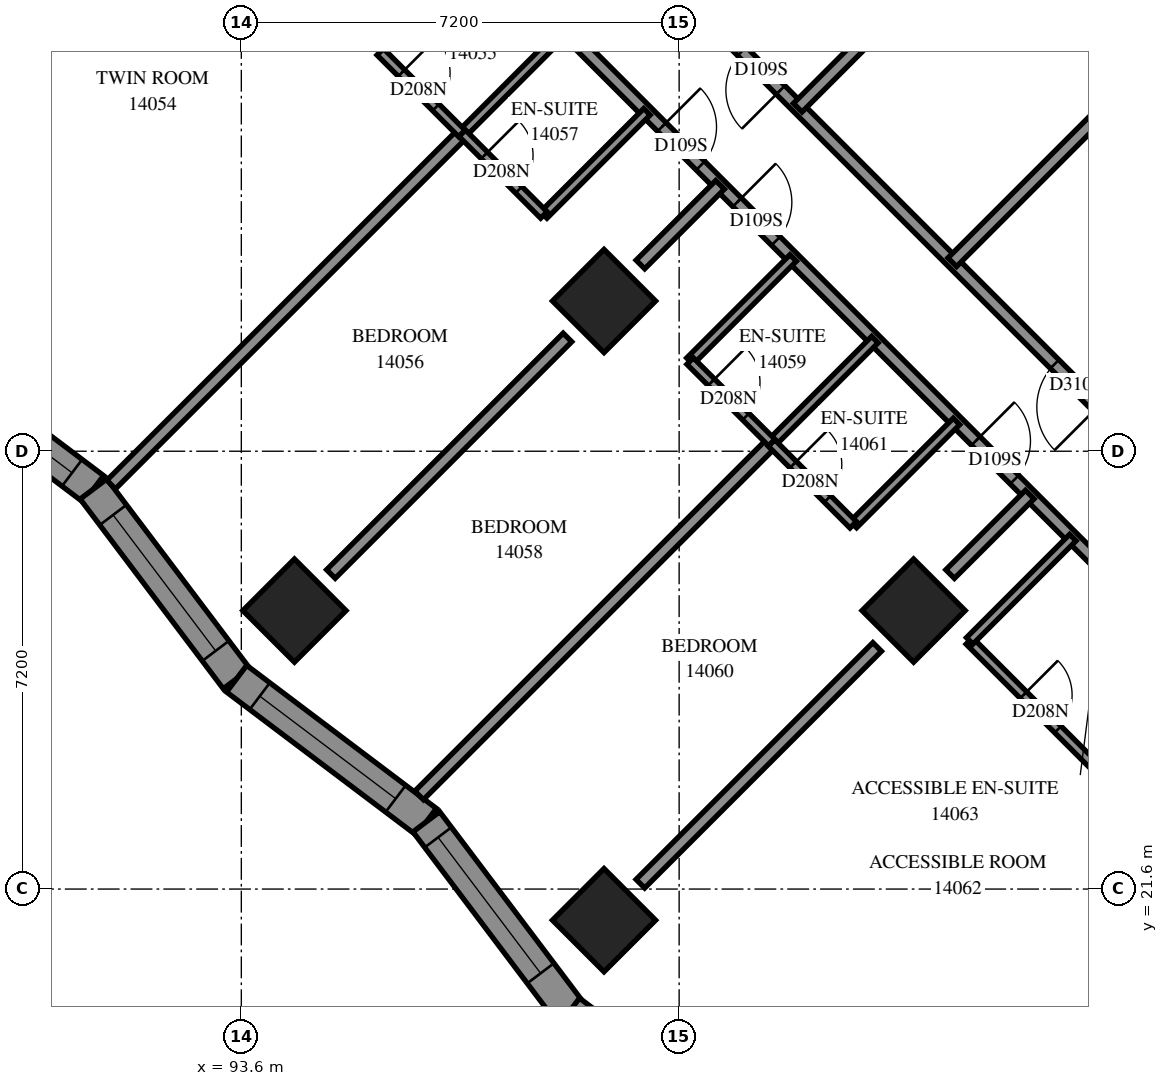
"""IFC4 building model, lengths in metres.
Left out: names, types, materials, properties, quantities, classifications, styles, units other than length and angle.
Written with IfcOpenShell. Run it as: python <this file> out.ifc"""

import sys

from ifc_helpers import new_model, si_unit, direction, frame, frame_2d, origin, origin_2d, place, context, subcontext, project, spatial, polyline, rectangle, outline, extrude, element, fill, save


model = new_model("IFC4")
c1 = context("Model", 3, precision=1e-05, world=origin(), true_north=direction((0.0, 1.0)))
c2 = subcontext(c1, "Body", "Model", "MODEL_VIEW")
j1 = project(units=[si_unit("LENGTHUNIT", "METRE"), si_unit("PLANEANGLEUNIT", "RADIAN")], contexts=[c1])
p1 = place(None, origin())
s1 = spatial("IfcSite", under=j1, at=p1, CompositionType="ELEMENT")
p2 = place(p1, origin())
s2 = spatial("IfcBuilding", under=s1, at=p2, CompositionType="ELEMENT")
p3 = place(p2, frame((0.0, 0.0, 54.2)))
s3 = spatial("IfcBuildingStorey", under=s2, at=p3, CompositionType="ELEMENT", Elevation=54.2)
for number, where, z_axis, x_axis in (
    (1, (99.565, 31.271, 0.0), (0.0, 0.0, 1.0), (0.707, -0.707, 0.0)),
    (2, (94.474, 26.18, 0.0), (0.0, 0.0, 1.0), (0.707, -0.707, 0.0)),
    (3, (104.656, 26.18, 0.0), (0.0, 0.0, 1.0), (0.707, -0.707, 0.0)),
    (4, (99.565, 21.088, 0.0), (0.0, 0.0, 1.0), (0.707, -0.707, 0.0)),
):
    element("IfcColumn", number, at=place(p3, frame(where, z_axis=z_axis, x_axis=x_axis)), inside=s3, PredefinedType="COLUMN", context=c2, shape_type="SweptSolid", body=[
        extrude(rectangle(XDim=1.2, YDim=1.2, at=origin_2d()), origin(), (0.0, 0.0, 1.0), 3.1),
    ])
p4 = place(p3, frame((88.05, 30.532, 0.0), z_axis=(0.0, 0.0, 1.0), x_axis=(0.7983449017, -0.6022004799, 0.0)))
e5 = element("IfcWall", 5, at=p4, inside=s3, PredefinedType="SOLIDWALL", context=c2, shape_type="SweptSolid", body=[
    extrude(outline(polyline([(-0.038, -0.275), (3.869, -0.275), (3.946, 0.275), (0.038, 0.275), (-0.038, -0.275)])), origin(), (0.0, 0.0, 1.0), 3.1),
])
p5 = place(p4, frame((0.666, 0.0, 0.5)))
e6 = element("IfcOpeningElement", 6, at=p5, cuts=e5, PredefinedType="OPENING", context=c2, shape_type="SweptSolid", body=[
    extrude(rectangle(XDim=2.8, YDim=2.45, at=frame_2d((1.4, 1.225))), frame((0.0, 0.285, 0.0), z_axis=(0.0, -1.0, 0.0), x_axis=(1.0, 0.0, 0.0)), (0.0, 0.0, 1.0), 0.57),
])
p6 = place(p3, frame((91.169, 28.179, 0.0), z_axis=(0.0, 0.0, 1.0), x_axis=(0.6022004799, -0.7983449017, 0.0)))
e7 = element("IfcWall", 7, at=p6, inside=s3, PredefinedType="SOLIDWALL", context=c2, shape_type="SweptSolid", body=[
    extrude(outline(polyline([(0.038, -0.275), (3.946, -0.275), (3.869, 0.275), (-0.038, 0.275), (0.038, -0.275)])), origin(), (0.0, 0.0, 1.0), 3.1),
])
p7 = place(p6, frame((0.535, 0.0, 0.5)))
e8 = element("IfcOpeningElement", 8, at=p7, cuts=e7, PredefinedType="OPENING", context=c2, shape_type="SweptSolid", body=[
    extrude(rectangle(XDim=2.8, YDim=2.45, at=frame_2d((1.4, 1.225))), frame((0.0, 0.285, 0.0), z_axis=(0.0, -1.0, 0.0), x_axis=(1.0, 0.0, 0.0)), (0.0, 0.0, 1.0), 0.57),
])
p8 = place(p3, frame((93.523, 25.059, 0.0), z_axis=(0.0, 0.0, 1.0), x_axis=(0.7983449017, -0.6022004799, 0.0)))
e9 = element("IfcWall", 9, at=p8, inside=s3, PredefinedType="SOLIDWALL", context=c2, shape_type="SweptSolid", body=[
    extrude(outline(polyline([(-0.038, -0.275), (3.869, -0.275), (3.946, 0.275), (0.038, 0.275), (-0.038, -0.275)])), origin(), (0.0, 0.0, 1.0), 3.1),
])
p9 = place(p8, frame((0.476, 0.0, 0.5)))
e10 = element("IfcOpeningElement", 10, at=p9, cuts=e9, PredefinedType="OPENING", context=c2, shape_type="SweptSolid", body=[
    extrude(rectangle(XDim=2.8, YDim=2.45, at=frame_2d((1.4, 1.225))), frame((0.0, 0.285, 0.0), z_axis=(0.0, -1.0, 0.0), x_axis=(1.0, 0.0, 0.0)), (0.0, 0.0, 1.0), 0.57),
])
p10 = place(p3, frame((96.642, 22.706, 0.0), z_axis=(0.0, 0.0, 1.0), x_axis=(0.6022004799, -0.7983449017, 0.0)))
e11 = element("IfcWall", 11, at=p10, inside=s3, PredefinedType="SOLIDWALL", context=c2, shape_type="SweptSolid", body=[
    extrude(outline(polyline([(0.038, -0.275), (3.946, -0.275), (3.869, 0.275), (-0.038, 0.275), (0.038, -0.275)])), origin(), (0.0, 0.0, 1.0), 3.1),
])
p11 = place(p10, frame((0.321, 0.0, 0.5)))
e12 = element("IfcOpeningElement", 12, at=p11, cuts=e11, PredefinedType="OPENING", context=c2, shape_type="SweptSolid", body=[
    extrude(rectangle(XDim=2.8, YDim=2.45, at=frame_2d((1.4, 1.225))), frame((0.0, 0.285, 0.0), z_axis=(0.0, -1.0, 0.0), x_axis=(1.0, 0.0, 0.0)), (0.0, 0.0, 1.0), 0.57),
])
p12 = place(p3, frame((98.996, 19.586, 0.0), z_axis=(0.0, 0.0, 1.0), x_axis=(0.7983537644, -0.6021887302, 0.0)))
e13 = element("IfcWall", 13, at=p12, inside=s3, PredefinedType="SOLIDWALL", context=c2, shape_type="SweptSolid", body=[
    extrude(outline(polyline([(-0.038, -0.275), (3.869, -0.275), (3.988, 0.275), (0.038, 0.275), (-0.038, -0.275)])), origin(), (0.0, 0.0, 1.0), 3.1),
])
p13 = place(p12, frame((1.004, 0.0, 0.5)))
e14 = element("IfcOpeningElement", 14, at=p13, cuts=e13, PredefinedType="OPENING", context=c2, shape_type="SweptSolid", body=[
    extrude(rectangle(XDim=1.2, YDim=2.45, at=frame_2d((0.6, 1.225))), frame((0.0, 0.285, 0.0), z_axis=(0.0, -1.0, 0.0), x_axis=(1.0, 0.0, 0.0)), (0.0, 0.0, 1.0), 0.57),
])
p14 = place(p3, frame((93.481, 41.167, 0.0), z_axis=(0.0, 0.0, 1.0), x_axis=(0.7071067812, -0.7071067812, 0.0)))
e15 = element("IfcWall", 15, at=p14, inside=s3, PredefinedType="PARTITIONING", context=c2, shape_type="SweptSolid", body=[
    extrude(rectangle(XDim=25.699, YDim=0.2, at=frame_2d((12.85, 0.0))), origin(), (0.0, 0.0, 1.0), 3.1),
])
p15 = place(p14, frame((2.8, 0.0, 0.0)))
e16 = element("IfcOpeningElement", 16, at=p15, cuts=e15, PredefinedType="OPENING", context=c2, shape_type="SweptSolid", body=[
    extrude(rectangle(XDim=0.9, YDim=2.1, at=frame_2d((0.45, 1.05))), frame((0.0, 0.11, 0.0), z_axis=(0.0, -1.0, 0.0), x_axis=(1.0, 0.0, 0.0)), (0.0, 0.0, 1.0), 0.22),
])
p16 = place(p14, frame((9.948, 0.0, 0.0)))
e17 = element("IfcOpeningElement", 17, at=p16, cuts=e15, PredefinedType="OPENING", context=c2, shape_type="SweptSolid", body=[
    extrude(rectangle(XDim=0.9, YDim=2.1, at=frame_2d((0.45, 1.05))), frame((0.0, 0.11, 0.0), z_axis=(0.0, -1.0, 0.0), x_axis=(1.0, 0.0, 0.0)), (0.0, 0.0, 1.0), 0.22),
])
p17 = place(p14, frame((11.7, 0.0, 0.0)))
e18 = element("IfcOpeningElement", 18, at=p17, cuts=e15, PredefinedType="OPENING", context=c2, shape_type="SweptSolid", body=[
    extrude(rectangle(XDim=0.9, YDim=2.1, at=frame_2d((0.45, 1.05))), frame((0.0, 0.11, 0.0), z_axis=(0.0, -1.0, 0.0), x_axis=(1.0, 0.0, 0.0)), (0.0, 0.0, 1.0), 0.22),
])
p18 = place(p14, frame((17.25, 0.0, 0.0)))
e19 = element("IfcOpeningElement", 19, at=p18, cuts=e15, PredefinedType="OPENING", context=c2, shape_type="SweptSolid", body=[
    extrude(rectangle(XDim=0.9, YDim=2.1, at=frame_2d((0.45, 1.05))), frame((0.0, 0.11, 0.0), z_axis=(0.0, -1.0, 0.0), x_axis=(1.0, 0.0, 0.0)), (0.0, 0.0, 1.0), 0.22),
])
p19 = place(p14, frame((22.82, 0.0, 0.0)))
e20 = element("IfcOpeningElement", 20, at=p19, cuts=e15, PredefinedType="OPENING", context=c2, shape_type="SweptSolid", body=[
    extrude(rectangle(XDim=0.9, YDim=2.1, at=frame_2d((0.45, 1.05))), frame((0.0, 0.11, 0.0), z_axis=(0.0, -1.0, 0.0), x_axis=(1.0, 0.0, 0.0)), (0.0, 0.0, 1.0), 0.22),
])
p20 = place(p3, frame((111.352, 25.855, 0.0), z_axis=(0.0, 0.0, 1.0), x_axis=(-0.7070418597, 0.7071716967, 0.0)))
e21 = element("IfcWall", 21, at=p20, inside=s3, PredefinedType="PARTITIONING", context=c2, shape_type="SweptSolid", body=[
    extrude(rectangle(XDim=13.864, YDim=0.2, at=frame_2d((6.932, 0.0))), origin(), (0.0, 0.0, 1.0), 3.1),
])
p21 = place(p20, frame((12.564, 0.0, 0.0)))
e22 = element("IfcOpeningElement", 22, at=p21, cuts=e21, PredefinedType="OPENING", context=c2, shape_type="SweptSolid", body=[
    extrude(rectangle(XDim=0.9, YDim=2.1, at=frame_2d((0.45, 1.05))), frame((0.0, 0.11, 0.0), z_axis=(0.0, -1.0, 0.0), x_axis=(1.0, 0.0, 0.0)), (0.0, 0.0, 1.0), 0.22),
])
p22 = place(p20, frame((5.19, 0.0, 0.0)))
e23 = element("IfcOpeningElement", 23, at=p22, cuts=e21, PredefinedType="OPENING", context=c2, shape_type="SweptSolid", body=[
    extrude(rectangle(XDim=1.0, YDim=2.1, at=frame_2d((0.5, 1.05))), frame((0.0, 0.11, 0.0), z_axis=(0.0, -1.0, 0.0), x_axis=(1.0, 0.0, 0.0)), (0.0, 0.0, 1.0), 0.22),
])
p23 = place(p3, frame((105.292, 31.908, 0.0), z_axis=(0.0, 0.0, 1.0), x_axis=(0.7071067812, 0.7071067812, 0.0)))
e24 = element("IfcWall", 24, at=p23, inside=s3, PredefinedType="PARTITIONING", context=c2, shape_type="SweptSolid", body=[
    extrude(rectangle(XDim=11.033, YDim=0.2, at=frame_2d((5.516, 0.0))), origin(), (0.0, 0.0, 1.0), 3.1),
])
p24 = place(p3, frame((86.312, 33.293, 0.0), z_axis=(0.0, 0.0, 1.0), x_axis=(0.7071067812, 0.7071067812, 0.0)))
e25 = element("IfcWall", 25, at=p24, inside=s3, PredefinedType="PARTITIONING", context=c2, shape_type="SweptSolid", body=[
    extrude(rectangle(XDim=10.641, YDim=0.2, at=frame_2d((5.321, 0.0))), origin(), (0.0, 0.0, 1.0), 3.1),
])
p25 = place(p3, frame((86.836, 34.524, 0.0), z_axis=(0.0, 0.0, 1.0), x_axis=(0.7071067812, 0.7071067812, 0.0)))
e26 = element("IfcWall", 26, at=p25, inside=s3, PredefinedType="PARTITIONING", context=c2, shape_type="SweptSolid", body=[
    extrude(rectangle(XDim=9.399, YDim=0.2, at=frame_2d((4.699, 0.0))), origin(), (0.0, 0.0, 1.0), 3.1),
])
p26 = place(p3, frame((96.524, 23.14, 0.0), z_axis=(0.0, 0.0, 1.0), x_axis=(0.7071128779, 0.7071006844, 0.0)))
e27 = element("IfcWall", 27, at=p26, inside=s3, PredefinedType="PARTITIONING", context=c2, shape_type="SweptSolid", body=[
    extrude(rectangle(XDim=8.201, YDim=0.2, at=frame_2d((4.101, 0.0))), origin(), (0.0, 0.0, 1.0), 3.1),
])
p27 = place(p3, frame((91.459, 28.251, 0.0), z_axis=(0.0, 0.0, 1.0), x_axis=(0.7072292218, 0.7069843194, 0.0)))
e28 = element("IfcWall", 28, at=p27, inside=s3, PredefinedType="PARTITIONING", context=c2, shape_type="SweptSolid", body=[
    extrude(rectangle(XDim=8.166, YDim=0.2, at=frame_2d((4.083, 0.0))), origin(), (0.0, 0.0, 1.0), 3.1),
])
p28 = place(p3, frame((100.162, 21.688, 0.0), z_axis=(0.0, 0.0, 1.0), x_axis=(0.7071067812, 0.7071067812, 0.0)))
e29 = element("IfcWall", 29, at=p28, inside=s3, PredefinedType="PARTITIONING", context=c2, shape_type="SweptSolid", body=[
    extrude(rectangle(XDim=5.507, YDim=0.2, at=frame_2d((2.753, 0.0))), origin(), (0.0, 0.0, 1.0), 3.1),
])
p29 = place(p3, frame((105.255, 16.599, 0.0), z_axis=(0.0, 0.0, 1.0), x_axis=(0.7071067812, 0.7071067812, 0.0)))
e30 = element("IfcWall", 30, at=p29, inside=s3, PredefinedType="PARTITIONING", context=c2, shape_type="SweptSolid", body=[
    extrude(rectangle(XDim=5.504, YDim=0.2, at=frame_2d((2.752, 0.0))), origin(), (0.0, 0.0, 1.0), 2.6),
])
p30 = place(p3, frame((95.073, 26.781, 0.0), z_axis=(0.0, 0.0, 1.0), x_axis=(0.7071067812, 0.7071067812, 0.0)))
e31 = element("IfcWall", 31, at=p30, inside=s3, PredefinedType="PARTITIONING", context=c2, shape_type="SweptSolid", body=[
    extrude(rectangle(XDim=5.501, YDim=0.2, at=frame_2d((2.751, 0.0))), origin(), (0.0, 0.0, 1.0), 3.1),
])
p31 = place(p3, frame((105.573, 25.681, 0.0), z_axis=(0.0, 0.0, 1.0), x_axis=(0.7071067812, -0.7071067812, 0.0)))
e32 = element("IfcWall", 32, at=p31, inside=s3, PredefinedType="PARTITIONING", context=c2, shape_type="SweptSolid", body=[
    extrude(rectangle(XDim=3.199, YDim=0.15, at=frame_2d((1.599, 0.0))), origin(), (0.0, 0.0, 1.0), 3.1),
])
p32 = place(p31, frame((1.258, 0.0, 0.0)))
e33 = element("IfcOpeningElement", 33, at=p32, cuts=e32, PredefinedType="OPENING", context=c2, shape_type="SweptSolid", body=[
    extrude(rectangle(XDim=0.8, YDim=2.1, at=frame_2d((0.4, 1.05))), frame((0.0, 0.085, 0.0), z_axis=(0.0, -1.0, 0.0), x_axis=(1.0, 0.0, 0.0)), (0.0, 0.0, 1.0), 0.17),
])
for number, where, z_axis, x_axis in (
    (34, (100.977, 30.281, 0.0), (0.0, 0.0, 1.0), (0.707, 0.707, 0.0)),
    (35, (98.573, 32.685, 0.0), (0.0, 0.0, 1.0), (0.707, 0.707, 0.0)),
):
    element("IfcWall", number, at=place(p3, frame(where, z_axis=z_axis, x_axis=x_axis)), inside=s3, PredefinedType="PARTITIONING", context=c2, shape_type="SweptSolid", body=[
        extrude(rectangle(XDim=2.401, YDim=0.15, at=frame_2d((1.201, 0.0))), origin(), (0.0, 0.0, 1.0), 3.1),
    ])
for number, where, z_axis, x_axis in (
    (36, (105.578, 25.682, 0.0), (0.0, 0.0, 1.0), (0.707, 0.708, 0.0)),
    (37, (97.234, 34.026, 0.0), (0.0, 0.0, 1.0), (0.707, 0.708, 0.0)),
):
    element("IfcWall", number, at=place(p3, frame(where, z_axis=z_axis, x_axis=x_axis)), inside=s3, PredefinedType="PARTITIONING", context=c2, shape_type="SweptSolid", body=[
        extrude(rectangle(XDim=2.4, YDim=0.15, at=frame_2d((1.2, 0.0))), origin(), (0.0, 0.0, 1.0), 3.1),
    ])
for number, where, z_axis, x_axis in (
    (38, (95.887, 35.373, 0.0), (0.0, 0.0, 1.0), (0.707, 0.707, 0.0)),
    (39, (102.323, 28.939, 0.0), (0.0, 0.0, 1.0), (0.707, 0.707, 0.0)),
    (40, (103.665, 27.595, 0.0), (0.0, 0.0, 1.0), (0.707, 0.707, 0.0)),
):
    element("IfcWall", number, at=place(p3, frame(where, z_axis=z_axis, x_axis=x_axis)), inside=s3, PredefinedType="PARTITIONING", context=c2, shape_type="SweptSolid", body=[
        extrude(rectangle(XDim=2.398, YDim=0.15, at=frame_2d((1.199, 0.0))), origin(), (0.0, 0.0, 1.0), 3.1),
    ])
p33 = place(p3, frame((95.885, 35.369, 0.0), z_axis=(0.0, 0.0, 1.0), x_axis=(0.7071067812, -0.7071067812, 0.0)))
e41 = element("IfcWall", 41, at=p33, inside=s3, PredefinedType="PARTITIONING", context=c2, shape_type="SweptSolid", body=[
    extrude(rectangle(XDim=1.901, YDim=0.15, at=frame_2d((0.95, 0.0))), origin(), (0.0, 0.0, 1.0), 3.1),
])
p34 = place(p33, frame((0.493, 0.0, 0.0)))
e42 = element("IfcOpeningElement", 42, at=p34, cuts=e41, PredefinedType="OPENING", context=c2, shape_type="SweptSolid", body=[
    extrude(rectangle(XDim=0.8, YDim=2.1, at=frame_2d((0.4, 1.05))), frame((0.0, 0.085, 0.0), z_axis=(0.0, -1.0, 0.0), x_axis=(1.0, 0.0, 0.0)), (0.0, 0.0, 1.0), 0.17),
])
p35 = place(p3, frame((100.981, 30.283, 0.0), z_axis=(0.0, 0.0, 1.0), x_axis=(0.7076330979, -0.7065800724, 0.0)))
e43 = element("IfcWall", 43, at=p35, inside=s3, PredefinedType="PARTITIONING", context=c2, shape_type="SweptSolid", body=[
    extrude(rectangle(XDim=1.899, YDim=0.15, at=frame_2d((0.95, 0.0))), origin(), (0.0, 0.0, 1.0), 3.1),
])
p36 = place(p35, frame((0.493, 0.0, 0.0)))
e44 = element("IfcOpeningElement", 44, at=p36, cuts=e43, PredefinedType="OPENING", context=c2, shape_type="SweptSolid", body=[
    extrude(rectangle(XDim=0.8, YDim=2.1, at=frame_2d((0.4, 1.05))), frame((0.0, 0.085, 0.0), z_axis=(0.0, -1.0, 0.0), x_axis=(1.0, 0.0, 0.0)), (0.0, 0.0, 1.0), 0.17),
])
p37 = place(p3, frame((97.233, 34.029, 0.0), z_axis=(0.0, 0.0, 1.0), x_axis=(0.7065800724, -0.7076330979, 0.0)))
e45 = element("IfcWall", 45, at=p37, inside=s3, PredefinedType="PARTITIONING", context=c2, shape_type="SweptSolid", body=[
    extrude(rectangle(XDim=1.899, YDim=0.15, at=frame_2d((0.95, 0.0))), origin(), (0.0, 0.0, 1.0), 3.1),
])
p38 = place(p37, frame((0.515, 0.0, 0.0)))
e46 = element("IfcOpeningElement", 46, at=p38, cuts=e45, PredefinedType="OPENING", context=c2, shape_type="SweptSolid", body=[
    extrude(rectangle(XDim=0.8, YDim=2.1, at=frame_2d((0.4, 1.05))), frame((0.0, 0.085, 0.0), z_axis=(0.0, -1.0, 0.0), x_axis=(1.0, 0.0, 0.0)), (0.0, 0.0, 1.0), 0.17),
])
p39 = place(p3, frame((102.321, 28.935, 0.0), z_axis=(0.0, 0.0, 1.0), x_axis=(0.7065800724, -0.7076330979, 0.0)))
e47 = element("IfcWall", 47, at=p39, inside=s3, PredefinedType="PARTITIONING", context=c2, shape_type="SweptSolid", body=[
    extrude(rectangle(XDim=1.899, YDim=0.15, at=frame_2d((0.95, 0.0))), origin(), (0.0, 0.0, 1.0), 3.1),
])
p40 = place(p39, frame((0.501, 0.0, 0.0)))
e48 = element("IfcOpeningElement", 48, at=p40, cuts=e47, PredefinedType="OPENING", context=c2, shape_type="SweptSolid", body=[
    extrude(rectangle(XDim=0.8, YDim=2.1, at=frame_2d((0.4, 1.05))), frame((0.0, 0.085, 0.0), z_axis=(0.0, -1.0, 0.0), x_axis=(1.0, 0.0, 0.0)), (0.0, 0.0, 1.0), 0.17),
])
p41 = place(p3, frame((100.163, 31.871, 0.0), z_axis=(0.0, 0.0, 1.0), x_axis=(0.7071067812, 0.7071067812, 0.0)))
e49 = element("IfcWall", 49, at=p41, inside=s3, PredefinedType="PARTITIONING", context=c2, shape_type="SweptSolid", body=[
    extrude(rectangle(XDim=1.853, YDim=0.2, at=frame_2d((0.926, 0.0))), origin(), (0.0, 0.0, 1.0), 3.1),
])
for number, where, z_axis, x_axis in (
    (50, (105.256, 26.78, 0.0), (0.0, 0.0, 1.0), (0.708, 0.707, 0.0)),
    (51, (102.75, 34.45, 0.0), (0.0, 0.0, 1.0), (0.707, 0.708, 0.0)),
):
    element("IfcWall", number, at=place(p3, frame(where, z_axis=z_axis, x_axis=x_axis)), inside=s3, PredefinedType="PARTITIONING", context=c2, shape_type="SweptSolid", body=[
        extrude(rectangle(XDim=1.851, YDim=0.2, at=frame_2d((0.926, 0.0))), origin(), (0.0, 0.0, 1.0), 3.1),
    ])
p42 = place(p5, origin())
e52 = element("IfcWindow", 52, at=p42, inside=s3, PartitioningType="SINGLE_PANEL", PredefinedType="WINDOW", context=c2, shape_type="SweptSolid", body=[
    extrude(rectangle(XDim=2.8, YDim=2.45, at=frame_2d((1.4, 1.225))), frame((0.0, 0.155, 0.0), z_axis=(0.0, -1.0, 0.0), x_axis=(1.0, 0.0, 0.0)), (0.0, 0.0, 1.0), 0.06),
])
fill(e6, e52)
p43 = place(p7, origin())
e53 = element("IfcWindow", 53, at=p43, inside=s3, PartitioningType="SINGLE_PANEL", PredefinedType="WINDOW", context=c2, shape_type="SweptSolid", body=[
    extrude(rectangle(XDim=2.8, YDim=2.45, at=frame_2d((1.4, 1.225))), frame((0.0, 0.155, 0.0), z_axis=(0.0, -1.0, 0.0), x_axis=(1.0, 0.0, 0.0)), (0.0, 0.0, 1.0), 0.06),
])
fill(e8, e53)
p44 = place(p9, origin())
e54 = element("IfcWindow", 54, at=p44, inside=s3, PartitioningType="SINGLE_PANEL", PredefinedType="WINDOW", context=c2, shape_type="SweptSolid", body=[
    extrude(rectangle(XDim=2.8, YDim=2.45, at=frame_2d((1.4, 1.225))), frame((0.0, 0.155, 0.0), z_axis=(0.0, -1.0, 0.0), x_axis=(1.0, 0.0, 0.0)), (0.0, 0.0, 1.0), 0.06),
])
fill(e10, e54)
p45 = place(p11, origin())
e55 = element("IfcWindow", 55, at=p45, inside=s3, PartitioningType="SINGLE_PANEL", PredefinedType="WINDOW", context=c2, shape_type="SweptSolid", body=[
    extrude(rectangle(XDim=2.8, YDim=2.45, at=frame_2d((1.4, 1.225))), frame((0.0, 0.155, 0.0), z_axis=(0.0, -1.0, 0.0), x_axis=(1.0, 0.0, 0.0)), (0.0, 0.0, 1.0), 0.06),
])
fill(e12, e55)
p46 = place(p21, origin())
e56 = element("IfcDoor", 56, at=p46, inside=s3, OperationType="SINGLE_SWING_RIGHT", PredefinedType="DOOR", context=c2, shape_type="SweptSolid", body=[
    extrude(rectangle(XDim=0.9, YDim=2.1, at=frame_2d((0.45, 1.05))), frame((0.0, 0.025, 0.0), z_axis=(0.0, -1.0, 0.0), x_axis=(1.0, 0.0, 0.0)), (0.0, 0.0, 1.0), 0.05),
])
fill(e22, e56)
p47 = place(p22, origin())
e57 = element("IfcDoor", 57, at=p47, inside=s3, OperationType="SINGLE_SWING_RIGHT", PredefinedType="DOOR", context=c2, shape_type="SweptSolid", body=[
    extrude(rectangle(XDim=1.0, YDim=2.1, at=frame_2d((0.5, 1.05))), frame((0.0, 0.025, 0.0), z_axis=(0.0, -1.0, 0.0), x_axis=(1.0, 0.0, 0.0)), (0.0, 0.0, 1.0), 0.05),
])
fill(e23, e57)
p48 = place(p34, origin())
e58 = element("IfcDoor", 58, at=p48, inside=s3, OperationType="SINGLE_SWING_RIGHT", PredefinedType="DOOR", context=c2, shape_type="SweptSolid", body=[
    extrude(rectangle(XDim=0.8, YDim=2.1, at=frame_2d((0.4, 1.05))), frame((0.0, 0.025, 0.0), z_axis=(0.0, -1.0, 0.0), x_axis=(1.0, 0.0, 0.0)), (0.0, 0.0, 1.0), 0.05),
])
fill(e42, e58)
p49 = place(p16, origin())
e59 = element("IfcDoor", 59, at=p49, inside=s3, OperationType="SINGLE_SWING_LEFT", PredefinedType="DOOR", context=c2, shape_type="SweptSolid", body=[
    extrude(rectangle(XDim=0.9, YDim=2.1, at=frame_2d((0.45, 1.05))), frame((0.0, 0.025, 0.0), z_axis=(0.0, -1.0, 0.0), x_axis=(1.0, 0.0, 0.0)), (0.0, 0.0, 1.0), 0.05),
])
fill(e17, e59)
p50 = place(p38, origin())
e60 = element("IfcDoor", 60, at=p50, inside=s3, OperationType="SINGLE_SWING_RIGHT", PredefinedType="DOOR", context=c2, shape_type="SweptSolid", body=[
    extrude(rectangle(XDim=0.8, YDim=2.1, at=frame_2d((0.4, 1.05))), frame((0.0, 0.025, 0.0), z_axis=(0.0, -1.0, 0.0), x_axis=(1.0, 0.0, 0.0)), (0.0, 0.0, 1.0), 0.05),
])
fill(e46, e60)
p51 = place(p17, origin())
e61 = element("IfcDoor", 61, at=p51, inside=s3, OperationType="SINGLE_SWING_RIGHT", PredefinedType="DOOR", context=c2, shape_type="SweptSolid", body=[
    extrude(rectangle(XDim=0.9, YDim=2.1, at=frame_2d((0.45, 1.05))), frame((0.0, 0.025, 0.0), z_axis=(0.0, -1.0, 0.0), x_axis=(1.0, 0.0, 0.0)), (0.0, 0.0, 1.0), 0.05),
])
fill(e18, e61)
p52 = place(p36, origin())
e62 = element("IfcDoor", 62, at=p52, inside=s3, OperationType="SINGLE_SWING_RIGHT", PredefinedType="DOOR", context=c2, shape_type="SweptSolid", body=[
    extrude(rectangle(XDim=0.8, YDim=2.1, at=frame_2d((0.4, 1.05))), frame((0.0, 0.025, 0.0), z_axis=(0.0, -1.0, 0.0), x_axis=(1.0, 0.0, 0.0)), (0.0, 0.0, 1.0), 0.05),
])
fill(e44, e62)
p53 = place(p18, origin())
e63 = element("IfcDoor", 63, at=p53, inside=s3, OperationType="SINGLE_SWING_LEFT", PredefinedType="DOOR", context=c2, shape_type="SweptSolid", body=[
    extrude(rectangle(XDim=0.9, YDim=2.1, at=frame_2d((0.45, 1.05))), frame((0.0, 0.025, 0.0), z_axis=(0.0, -1.0, 0.0), x_axis=(1.0, 0.0, 0.0)), (0.0, 0.0, 1.0), 0.05),
])
fill(e19, e63)
p54 = place(p40, origin())
e64 = element("IfcDoor", 64, at=p54, inside=s3, OperationType="SINGLE_SWING_RIGHT", PredefinedType="DOOR", context=c2, shape_type="SweptSolid", body=[
    extrude(rectangle(XDim=0.8, YDim=2.1, at=frame_2d((0.4, 1.05))), frame((0.0, 0.025, 0.0), z_axis=(0.0, -1.0, 0.0), x_axis=(1.0, 0.0, 0.0)), (0.0, 0.0, 1.0), 0.05),
])
fill(e48, e64)
p55 = place(p32, origin())
e65 = element("IfcDoor", 65, at=p55, inside=s3, OperationType="SINGLE_SWING_RIGHT", PredefinedType="DOOR", context=c2, shape_type="SweptSolid", body=[
    extrude(rectangle(XDim=0.8, YDim=2.1, at=frame_2d((0.4, 1.05))), frame((0.0, 0.025, 0.0), z_axis=(0.0, -1.0, 0.0), x_axis=(1.0, 0.0, 0.0)), (0.0, 0.0, 1.0), 0.05),
])
fill(e33, e65)
save(model, sys.argv[1])
